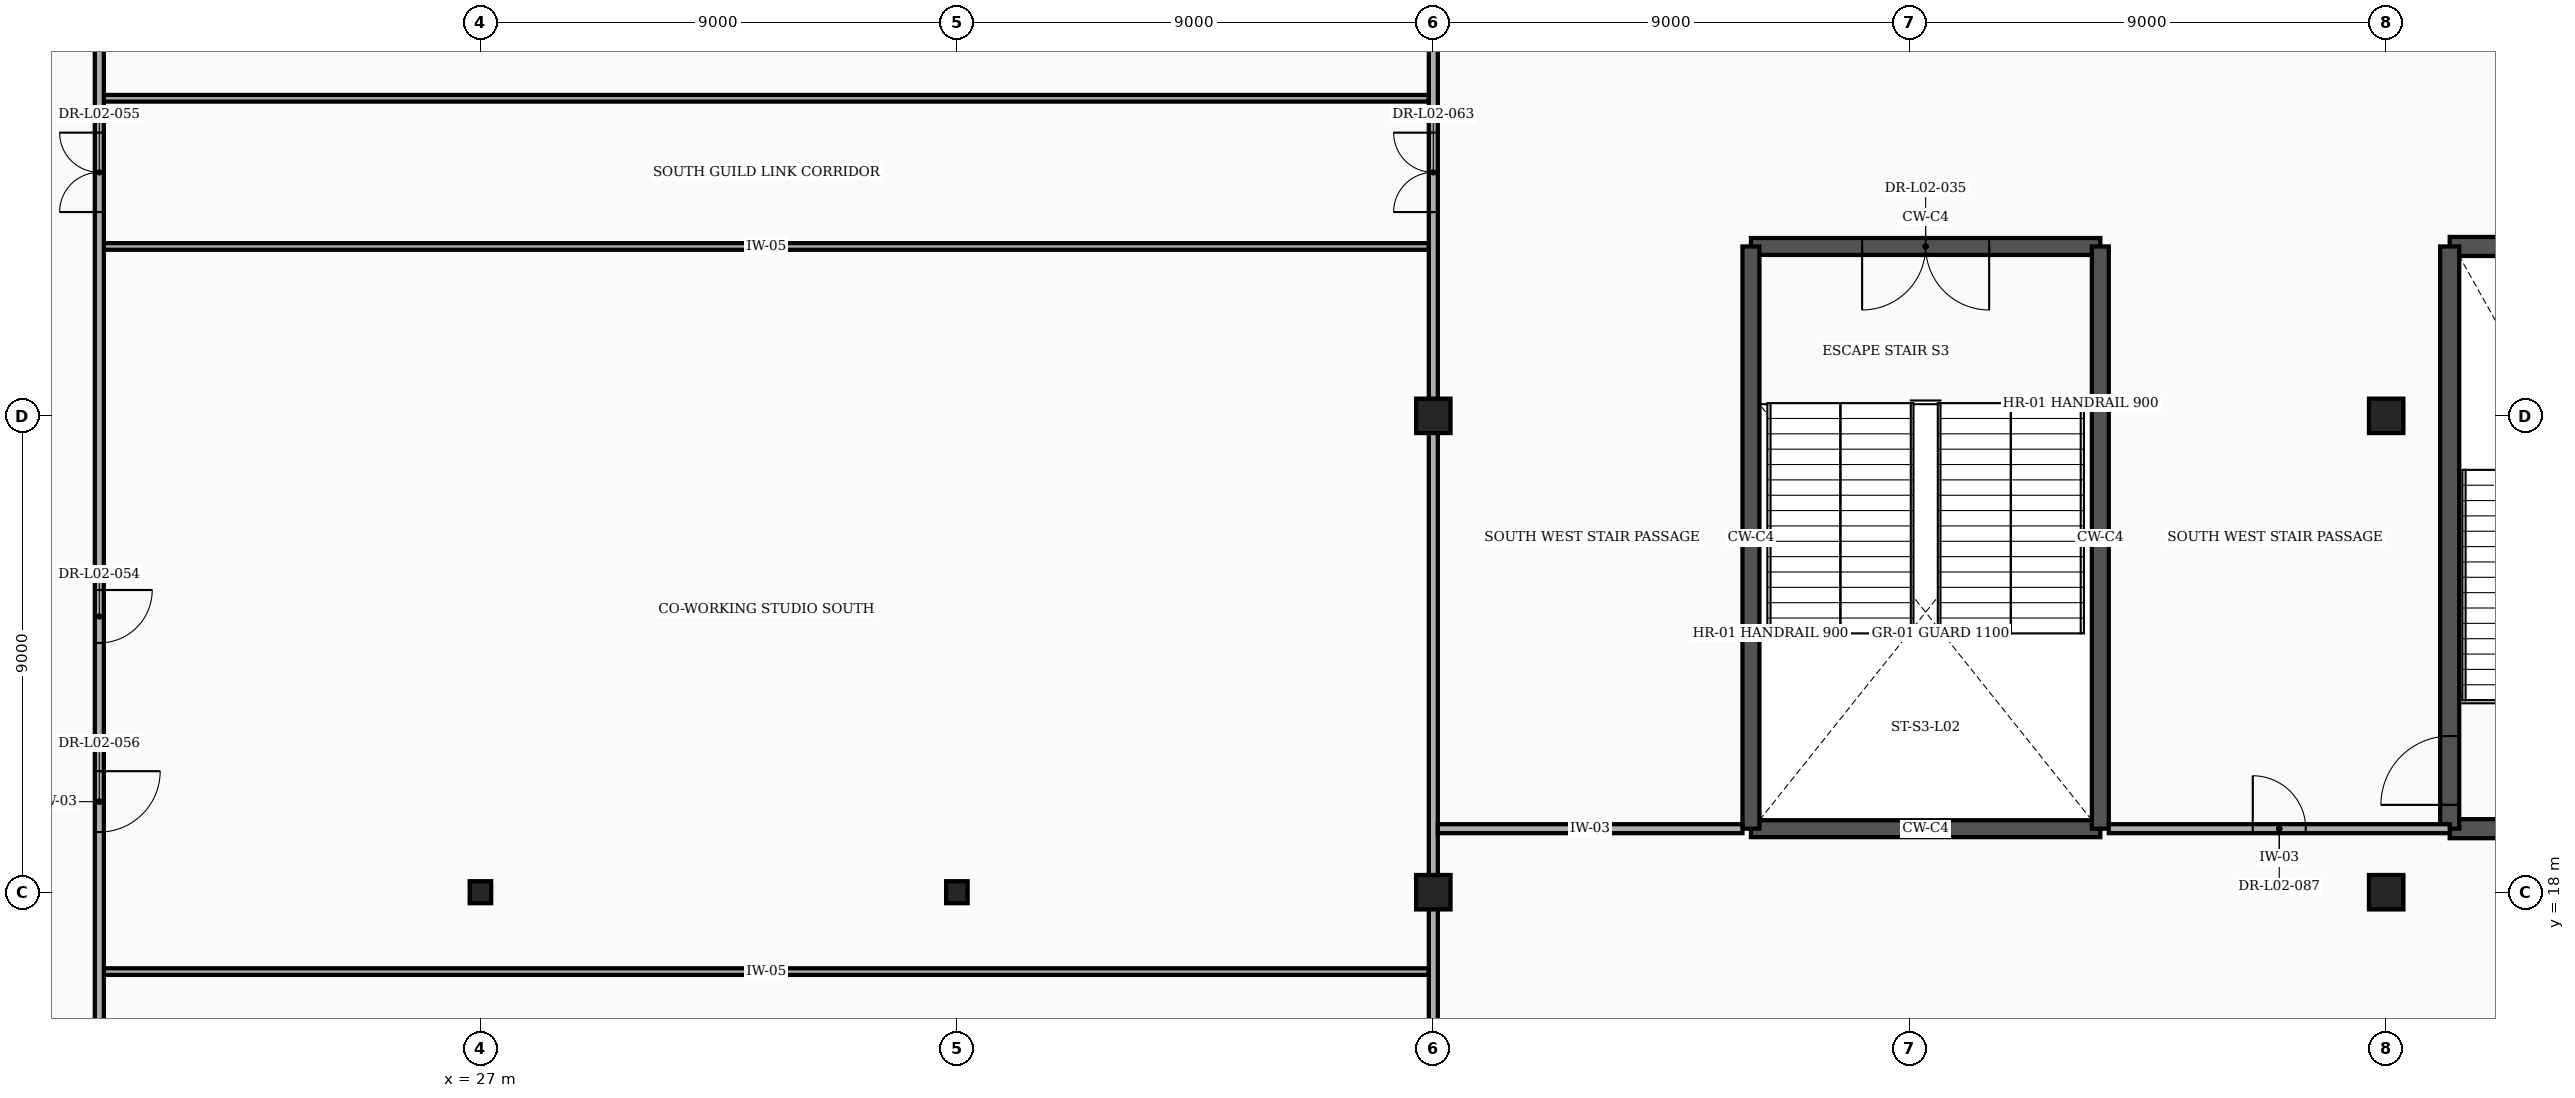
"""IFC4 building model, lengths in metres.
Left out: names, types, materials, properties, quantities, classifications, styles, units other than length and angle.
Written with IfcOpenShell. Run it as: python <this file> out.ifc"""

import sys

from ifc_helpers import new_model, si_unit, direction, frame, frame_2d, origin, origin_2d, place, context, subcontext, project, spatial, rectangle, i_section, extrude, element, fill, save


model = new_model("IFC4")
c1 = context("Model", 3, precision=1e-05, world=origin(), true_north=direction((0.0, 1.0)))
c2 = subcontext(c1, "Body", "Model", "MODEL_VIEW")
j1 = project(units=[si_unit("LENGTHUNIT", "METRE"), si_unit("PLANEANGLEUNIT", "RADIAN")], contexts=[c1])
p1 = place(None, origin())
s1 = spatial("IfcSite", under=j1, at=p1, CompositionType="ELEMENT")
p2 = place(p1, origin())
s2 = spatial("IfcBuilding", under=s1, at=p2, CompositionType="ELEMENT")
p3 = place(p2, frame((0.0, 0.0, 11.4)))
s3 = spatial("IfcBuildingStorey", under=s2, at=p3, CompositionType="ELEMENT", Elevation=11.4)
for number, where, z_axis, x_axis in (
    (1, (27.0, 18.0, 0.0), (0.0, 0.0, 1.0), (1.0, 0.0, 0.0)),
    (2, (36.0, 18.0, 0.0), (0.0, 0.0, 1.0), (1.0, 0.0, 0.0)),
):
    element("IfcColumn", number, at=place(p3, frame(where, z_axis=z_axis, x_axis=x_axis)), inside=s3, PredefinedType="COLUMN", context=c2, shape_type="SweptSolid", body=[
        extrude(i_section(OverallWidth=0.406, OverallDepth=0.416, WebThickness=0.03, FlangeThickness=0.048, at=origin_2d()), origin(), (0.0, 0.0, 1.0), 5.4),
    ])
for number, where, z_axis, x_axis in (
    (3, (45.0, 18.0, 0.0), (0.0, 0.0, 1.0), (1.0, 0.0, 0.0)),
    (4, (45.0, 27.0, 0.0), (0.0, 0.0, 1.0), (1.0, 0.0, 0.0)),
    (5, (63.0, 18.0, 0.0), (0.0, 0.0, 1.0), (1.0, 0.0, 0.0)),
    (6, (63.0, 27.0, 0.0), (0.0, 0.0, 1.0), (1.0, 0.0, 0.0)),
):
    element("IfcColumn", number, at=place(p3, frame(where, z_axis=z_axis, x_axis=x_axis)), inside=s3, PredefinedType="COLUMN", context=c2, shape_type="SweptSolid", body=[
        extrude(rectangle(XDim=0.65, YDim=0.65, at=origin_2d()), origin(), (0.0, 0.0, 1.0), 5.4),
    ])
for number, where, z_axis, x_axis in (
    (7, (64.2, 19.2, 0.0), (0.0, 0.0, 1.0), (1.0, 0.0, 0.0)),
    (8, (64.2, 30.2, 0.0), (0.0, 0.0, 1.0), (1.0, 0.0, 0.0)),
):
    element("IfcWall", number, at=place(p3, frame(where, z_axis=z_axis, x_axis=x_axis)), inside=s3, PredefinedType="SHEAR", context=c2, shape_type="SweptSolid", body=[
        extrude(rectangle(XDim=6.6, YDim=0.36, at=frame_2d((3.3, 0.0))), origin(), (0.0, 0.0, 1.0), 5.15),
    ])
p4 = place(p3, frame((64.2, 19.2, 0.0), z_axis=(0.0, 0.0, 1.0), x_axis=(0.0, 1.0, 0.0)))
e9 = element("IfcWall", 9, at=p4, inside=s3, PredefinedType="SHEAR", context=c2, shape_type="SweptSolid", body=[
    extrude(rectangle(XDim=11.0, YDim=0.36, at=frame_2d((5.5, 0.0))), origin(), (0.0, 0.0, 1.0), 5.15),
])
p5 = place(p4, frame((0.45, 0.0, 0.0)))
e10 = element("IfcOpeningElement", 10, at=p5, cuts=e9, PredefinedType="OPENING", context=c2, shape_type="SweptSolid", body=[
    extrude(rectangle(XDim=1.3, YDim=2.2, at=frame_2d((0.65, 1.1))), frame((0.0, 0.192, 0.0), z_axis=(0.0, -1.0, 0.0), x_axis=(1.0, 0.0, 0.0)), (0.0, 0.0, 1.0), 0.384),
])
p6 = place(p3, frame((51.0, 19.2, 0.0), z_axis=(0.0, 0.0, 1.0), x_axis=(1.0, 0.0, 0.0)))
e11 = element("IfcWall", 11, at=p6, inside=s3, PredefinedType="SHEAR", context=c2, shape_type="SweptSolid", body=[
    extrude(rectangle(XDim=6.6, YDim=0.32, at=frame_2d((3.3, 0.0))), origin(), (0.0, 0.0, 1.0), 5.15),
])
p7 = place(p3, frame((51.0, 30.2, 0.0), z_axis=(0.0, 0.0, 1.0), x_axis=(1.0, 0.0, 0.0)))
e12 = element("IfcWall", 12, at=p7, inside=s3, PredefinedType="SHEAR", context=c2, shape_type="SweptSolid", body=[
    extrude(rectangle(XDim=6.6, YDim=0.32, at=frame_2d((3.3, 0.0))), origin(), (0.0, 0.0, 1.0), 5.15),
])
p8 = place(p7, frame((2.1, 0.0, 0.0)))
e13 = element("IfcOpeningElement", 13, at=p8, cuts=e12, PredefinedType="OPENING", context=c2, shape_type="SweptSolid", body=[
    extrude(rectangle(XDim=2.4, YDim=2.25, at=frame_2d((1.2, 1.125))), frame((0.0, 0.172, 0.0), z_axis=(0.0, -1.0, 0.0), x_axis=(1.0, 0.0, 0.0)), (0.0, 0.0, 1.0), 0.344),
])
for number, where, z_axis, x_axis in (
    (14, (51.0, 19.2, 0.0), (0.0, 0.0, 1.0), (0.0, 1.0, 0.0)),
    (15, (57.6, 19.2, 0.0), (0.0, 0.0, 1.0), (0.0, 1.0, 0.0)),
):
    element("IfcWall", number, at=place(p3, frame(where, z_axis=z_axis, x_axis=x_axis)), inside=s3, PredefinedType="SHEAR", context=c2, shape_type="SweptSolid", body=[
        extrude(rectangle(XDim=11.0, YDim=0.32, at=frame_2d((5.5, 0.0))), origin(), (0.0, 0.0, 1.0), 5.15),
    ])
for number, where, z_axis, x_axis in (
    (16, (19.885, 16.5, 0.0), (0.0, 0.0, 1.0), (1.0, 0.0, 0.0)),
    (17, (19.885, 30.2, 0.0), (0.0, 0.0, 1.0), (1.0, 0.0, 0.0)),
    (18, (19.885, 33.0, 0.0), (0.0, 0.0, 1.0), (1.0, 0.0, 0.0)),
):
    element("IfcWall", number, at=place(p3, frame(where, z_axis=z_axis, x_axis=x_axis)), inside=s3, PredefinedType="PARTITIONING", context=c2, shape_type="SweptSolid", body=[
        extrude(rectangle(XDim=25.03, YDim=0.125, at=frame_2d((12.515, 0.0))), origin(), (0.0, 0.0, 1.0), 5.15),
    ])
p9 = place(p3, frame((19.8, 0.183, 0.0), z_axis=(0.0, 0.0, 1.0), x_axis=(0.0, 1.0, 0.0)))
e19 = element("IfcWall", 19, at=p9, inside=s3, PredefinedType="PARTITIONING", context=c2, shape_type="SweptSolid", body=[
    extrude(rectangle(XDim=39.057, YDim=0.17, at=frame_2d((19.529, 0.0))), origin(), (0.0, 0.0, 1.0), 5.15),
])
p10 = place(p9, frame((9.527, 0.0, 0.0)))
e20 = element("IfcOpeningElement", 20, at=p10, cuts=e19, PredefinedType="OPENING", context=c2, shape_type="SweptSolid", body=[
    extrude(rectangle(XDim=1.15, YDim=2.15, at=frame_2d((0.575, 1.075))), frame((0.0, 0.097, 0.0), z_axis=(0.0, -1.0, 0.0), x_axis=(1.0, 0.0, 0.0)), (0.0, 0.0, 1.0), 0.194),
])
p11 = place(p9, frame((22.527, 0.0, 0.0)))
e21 = element("IfcOpeningElement", 21, at=p11, cuts=e19, PredefinedType="OPENING", context=c2, shape_type="SweptSolid", body=[
    extrude(rectangle(XDim=1.0, YDim=2.15, at=frame_2d((0.5, 1.075))), frame((0.0, 0.097, 0.0), z_axis=(0.0, -1.0, 0.0), x_axis=(1.0, 0.0, 0.0)), (0.0, 0.0, 1.0), 0.194),
])
p12 = place(p9, frame((30.668, 0.0, 0.0)))
e22 = element("IfcOpeningElement", 22, at=p12, cuts=e19, PredefinedType="OPENING", context=c2, shape_type="SweptSolid", body=[
    extrude(rectangle(XDim=1.5, YDim=2.2, at=frame_2d((0.75, 1.1))), frame((0.0, 0.097, 0.0), z_axis=(0.0, -1.0, 0.0), x_axis=(1.0, 0.0, 0.0)), (0.0, 0.0, 1.0), 0.194),
])
p13 = place(p9, frame((18.954, 0.0, 0.0)))
e23 = element("IfcOpeningElement", 23, at=p13, cuts=e19, PredefinedType="OPENING", context=c2, shape_type="SweptSolid", body=[
    extrude(rectangle(XDim=1.15, YDim=2.15, at=frame_2d((0.575, 1.075))), frame((0.0, 0.097, 0.0), z_axis=(0.0, -1.0, 0.0), x_axis=(1.0, 0.0, 0.0)), (0.0, 0.0, 1.0), 0.194),
])
p14 = place(p9, frame((0.3, 0.0, 0.0)))
e24 = element("IfcOpeningElement", 24, at=p14, cuts=e19, PredefinedType="OPENING", context=c2, shape_type="SweptSolid", body=[
    extrude(rectangle(XDim=1.15, YDim=2.15, at=frame_2d((0.575, 1.075))), frame((0.0, 0.097, 0.0), z_axis=(0.0, -1.0, 0.0), x_axis=(1.0, 0.0, 0.0)), (0.0, 0.0, 1.0), 0.194),
])
p15 = place(p9, frame((37.758, 0.0, 0.0)))
e25 = element("IfcOpeningElement", 25, at=p15, cuts=e19, PredefinedType="OPENING", context=c2, shape_type="SweptSolid", body=[
    extrude(rectangle(XDim=1.0, YDim=2.15, at=frame_2d((0.5, 1.075))), frame((0.0, 0.097, 0.0), z_axis=(0.0, -1.0, 0.0), x_axis=(1.0, 0.0, 0.0)), (0.0, 0.0, 1.0), 0.194),
])
p16 = place(p9, frame((1.95, 0.0, 0.0)))
e26 = element("IfcOpeningElement", 26, at=p16, cuts=e19, PredefinedType="OPENING", context=c2, shape_type="SweptSolid", body=[
    extrude(rectangle(XDim=1.9, YDim=2.35, at=frame_2d((0.95, 1.175))), frame((0.0, 0.097, 0.0), z_axis=(0.0, -1.0, 0.0), x_axis=(1.0, 0.0, 0.0)), (0.0, 0.0, 1.0), 0.194),
])
p17 = place(p3, frame((45.0, 0.22, 0.0), z_axis=(0.0, 0.0, 1.0), x_axis=(0.0, 1.0, 0.0)))
e27 = element("IfcWall", 27, at=p17, inside=s3, PredefinedType="PARTITIONING", context=c2, shape_type="SweptSolid", body=[
    extrude(rectangle(XDim=17.56, YDim=0.17, at=frame_2d((8.78, 0.0))), origin(), (0.0, 0.0, 1.0), 4.609),
])
p18 = place(p3, frame((45.0, 18.22, 0.0), z_axis=(0.0, 0.0, 1.0), x_axis=(0.0, 1.0, 0.0)))
e28 = element("IfcWall", 28, at=p18, inside=s3, PredefinedType="PARTITIONING", context=c2, shape_type="SweptSolid", body=[
    extrude(rectangle(XDim=8.56, YDim=0.17, at=frame_2d((4.28, 0.0))), origin(), (0.0, 0.0, 1.0), 4.617),
])
p19 = place(p3, frame((45.0, 27.22, 0.0), z_axis=(0.0, 0.0, 1.0), x_axis=(0.0, 1.0, 0.0)))
e29 = element("IfcWall", 29, at=p19, inside=s3, PredefinedType="PARTITIONING", context=c2, shape_type="SweptSolid", body=[
    extrude(rectangle(XDim=8.56, YDim=0.17, at=frame_2d((4.28, 0.0))), origin(), (0.0, 0.0, 1.0), 4.617),
])
p20 = place(p19, frame((3.63, 0.0, 0.0)))
e30 = element("IfcOpeningElement", 30, at=p20, cuts=e29, PredefinedType="OPENING", context=c2, shape_type="SweptSolid", body=[
    extrude(rectangle(XDim=1.5, YDim=2.2, at=frame_2d((0.75, 1.1))), frame((0.0, 0.097, 0.0), z_axis=(0.0, -1.0, 0.0), x_axis=(1.0, 0.0, 0.0)), (0.0, 0.0, 1.0), 0.194),
])
p21 = place(p3, frame((45.085, 19.2, 0.0), z_axis=(0.0, 0.0, 1.0), x_axis=(1.0, 0.0, 0.0)))
e31 = element("IfcWall", 31, at=p21, inside=s3, PredefinedType="PARTITIONING", context=c2, shape_type="SweptSolid", body=[
    extrude(rectangle(XDim=5.755, YDim=0.17, at=frame_2d((2.877, 0.0))), origin(), (0.0, 0.0, 1.0), 5.15),
])
p22 = place(p3, frame((57.76, 19.2, 0.0), z_axis=(0.0, 0.0, 1.0), x_axis=(1.0, 0.0, 0.0)))
e32 = element("IfcWall", 32, at=p22, inside=s3, PredefinedType="PARTITIONING", context=c2, shape_type="SweptSolid", body=[
    extrude(rectangle(XDim=6.44, YDim=0.17, at=frame_2d((3.22, 0.0))), origin(), (0.0, 0.0, 1.0), 5.15),
])
p23 = place(p22, frame((2.72, 0.0, 0.0)))
e33 = element("IfcOpeningElement", 33, at=p23, cuts=e32, PredefinedType="OPENING", context=c2, shape_type="SweptSolid", body=[
    extrude(rectangle(XDim=1.0, YDim=2.15, at=frame_2d((0.5, 1.075))), frame((0.0, 0.097, 0.0), z_axis=(0.0, -1.0, 0.0), x_axis=(1.0, 0.0, 0.0)), (0.0, 0.0, 1.0), 0.194),
])
p24 = place(p5, origin())
e34 = element("IfcDoor", 34, at=p24, inside=s3, OperationType="SINGLE_SWING_LEFT", PredefinedType="DOOR", context=c2, shape_type="SweptSolid", body=[
    extrude(rectangle(XDim=1.3, YDim=2.2, at=frame_2d((0.65, 1.1))), frame((0.0, 0.025, 0.0), z_axis=(0.0, -1.0, 0.0), x_axis=(1.0, 0.0, 0.0)), (0.0, 0.0, 1.0), 0.05),
])
fill(e10, e34)
p25 = place(p8, frame((2.4, 0.0, 0.0), z_axis=(0.0, 0.0, 1.0), x_axis=(-1.0, 0.0, 0.0)))
e35 = element("IfcDoor", 35, at=p25, inside=s3, OperationType="DOUBLE_DOOR_SINGLE_SWING", PredefinedType="DOOR", context=c2, shape_type="SweptSolid", body=[
    extrude(rectangle(XDim=2.4, YDim=2.25, at=frame_2d((1.2, 1.125))), frame((0.0, 0.025, 0.0), z_axis=(0.0, -1.0, 0.0), x_axis=(1.0, 0.0, 0.0)), (0.0, 0.0, 1.0), 0.05),
])
fill(e13, e35)
p26 = place(p11, frame((1.0, 0.0, 0.0), z_axis=(0.0, 0.0, 1.0), x_axis=(-1.0, 0.0, 0.0)))
e36 = element("IfcDoor", 36, at=p26, inside=s3, OperationType="SINGLE_SWING_LEFT", PredefinedType="DOOR", context=c2, shape_type="SweptSolid", body=[
    extrude(rectangle(XDim=1.0, YDim=2.15, at=frame_2d((0.5, 1.075))), frame((0.0, 0.025, 0.0), z_axis=(0.0, -1.0, 0.0), x_axis=(1.0, 0.0, 0.0)), (0.0, 0.0, 1.0), 0.05),
])
fill(e21, e36)
p27 = place(p12, origin())
e37 = element("IfcDoor", 37, at=p27, inside=s3, OperationType="DOUBLE_DOOR_SINGLE_SWING", PredefinedType="DOOR", context=c2, shape_type="SweptSolid", body=[
    extrude(rectangle(XDim=1.5, YDim=2.2, at=frame_2d((0.75, 1.1))), frame((0.0, 0.025, 0.0), z_axis=(0.0, -1.0, 0.0), x_axis=(1.0, 0.0, 0.0)), (0.0, 0.0, 1.0), 0.05),
])
fill(e22, e37)
p28 = place(p13, frame((1.15, 0.0, 0.0), z_axis=(0.0, 0.0, 1.0), x_axis=(-1.0, 0.0, 0.0)))
e38 = element("IfcDoor", 38, at=p28, inside=s3, OperationType="SINGLE_SWING_LEFT", PredefinedType="DOOR", context=c2, shape_type="SweptSolid", body=[
    extrude(rectangle(XDim=1.15, YDim=2.15, at=frame_2d((0.575, 1.075))), frame((0.0, 0.025, 0.0), z_axis=(0.0, -1.0, 0.0), x_axis=(1.0, 0.0, 0.0)), (0.0, 0.0, 1.0), 0.05),
])
fill(e23, e38)
p29 = place(p20, origin())
e39 = element("IfcDoor", 39, at=p29, inside=s3, OperationType="DOUBLE_DOOR_SINGLE_SWING", PredefinedType="DOOR", context=c2, shape_type="SweptSolid", body=[
    extrude(rectangle(XDim=1.5, YDim=2.2, at=frame_2d((0.75, 1.1))), frame((0.0, 0.025, 0.0), z_axis=(0.0, -1.0, 0.0), x_axis=(1.0, 0.0, 0.0)), (0.0, 0.0, 1.0), 0.05),
])
fill(e30, e39)
p30 = place(p23, origin())
e40 = element("IfcDoor", 40, at=p30, inside=s3, OperationType="SINGLE_SWING_LEFT", PredefinedType="DOOR", context=c2, shape_type="SweptSolid", body=[
    extrude(rectangle(XDim=1.0, YDim=2.15, at=frame_2d((0.5, 1.075))), frame((0.0, 0.025, 0.0), z_axis=(0.0, -1.0, 0.0), x_axis=(1.0, 0.0, 0.0)), (0.0, 0.0, 1.0), 0.05),
])
fill(e33, e40)
save(model, sys.argv[1])
